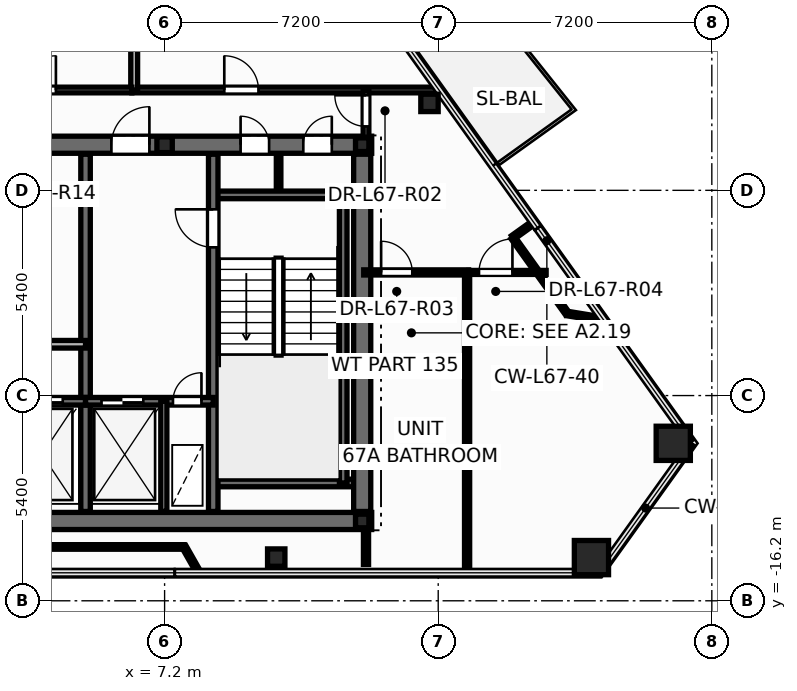
"""IFC4 building model, lengths in metres.
Left out: names, types, materials, properties, quantities, classifications, styles, units other than length and angle.
Written with IfcOpenShell. Run it as: python <this file> out.ifc"""

import sys

from ifc_helpers import new_model, si_unit, direction, frame, frame_2d, origin, origin_2d, place, context, subcontext, project, spatial, rectangle, hollow_rectangle, hollow_circle, i_section, extrude, element, fill, save


model = new_model("IFC4")
c1 = context("Model", 3, precision=1e-05, world=origin(), true_north=direction((0.0, 1.0)))
c2 = subcontext(c1, "Body", "Model", "MODEL_VIEW")
j1 = project(units=[si_unit("LENGTHUNIT", "METRE"), si_unit("PLANEANGLEUNIT", "RADIAN")], contexts=[c1])
p1 = place(None, origin())
s1 = spatial("IfcSite", under=j1, at=p1, CompositionType="ELEMENT")
p2 = place(p1, origin())
s2 = spatial("IfcBuilding", under=s1, at=p2, CompositionType="ELEMENT")
p3 = place(p2, frame((0.0, 0.0, 256.2)))
s3 = spatial("IfcBuildingStorey", under=s2, at=p3, CompositionType="ELEMENT", Elevation=256.2)
for number, where, z_axis, x_axis in (
    (1, (18.432, -15.063, 0.0), (0.0, 0.0, 1.0), (1.0, 0.0, 0.0)),
    (2, (20.585, -12.057, 0.0), (0.0, 0.0, 1.0), (1.0, 0.0, 0.0)),
):
    element("IfcColumn", number, at=place(p3, frame(where, z_axis=z_axis, x_axis=x_axis)), inside=s3, PredefinedType="COLUMN", context=c2, shape_type="SweptSolid", body=[
        extrude(hollow_rectangle(XDim=0.9, YDim=0.9, WallThickness=0.04, at=origin_2d()), origin(), (0.0, 0.0, 1.0), 3.6),
    ])
for number, where, z_axis, x_axis in (
    (3, (10.138, -15.063, 0.0), (0.0, 0.0, 1.0), (1.0, 0.0, 0.0)),
    (4, (14.171, -3.099, 0.0), (0.0, 0.0, 1.0), (1.0, 0.0, 0.0)),
):
    element("IfcColumn", number, at=place(p3, frame(where, z_axis=z_axis, x_axis=x_axis)), inside=s3, PredefinedType="COLUMN", context=c2, shape_type="SweptSolid", body=[
        extrude(hollow_circle(Radius=0.229, WallThickness=0.016, at=origin_2d()), origin(), (0.0, 0.0, 1.0), 3.6),
    ])
for number, where, z_axis, x_axis in (
    (5, (12.4, -14.1, 0.0), (0.0, 0.0, 1.0), (1.0, 0.0, 0.0)),
    (6, (12.4, -4.2, 0.0), (0.0, 0.0, 1.0), (1.0, 0.0, 0.0)),
):
    element("IfcColumn", number, at=place(p3, frame(where, z_axis=z_axis, x_axis=x_axis)), inside=s3, PredefinedType="COLUMN", context=c2, shape_type="SweptSolid", body=[
        extrude(i_section(OverallWidth=0.352, OverallDepth=0.359, WebThickness=0.018, FlangeThickness=0.026, at=origin_2d()), origin(), (0.0, 0.0, 1.0), 3.6),
    ])
p4 = place(p3, frame((7.2, -4.2, 0.0), z_axis=(0.0, 0.0, 1.0), x_axis=(1.0, 0.0, 0.0)))
e7 = element("IfcColumn", 7, at=p4, inside=s3, PredefinedType="PILASTER", context=c2, shape_type="SweptSolid", body=[
    extrude(i_section(OverallWidth=0.405, OverallDepth=0.414, WebThickness=0.022, FlangeThickness=0.032, at=origin_2d()), origin(), (0.0, 0.0, 1.0), 3.6),
])
p5 = place(p3, frame((10.2, -5.52, 0.0), z_axis=(0.0, 0.0, 1.0), x_axis=(0.0, 1.0, 0.0)))
e8 = element("IfcWall", 8, at=p5, inside=s3, PredefinedType="PARTITIONING", context=c2, shape_type="SweptSolid", body=[
    extrude(rectangle(XDim=1.12, YDim=0.12, at=frame_2d((0.56, 0.0))), origin(), (0.0, 0.0, 1.0), 3.345),
])
p6 = place(p3, frame((-12.65, -14.1, 0.0), z_axis=(0.0, 0.0, 1.0), x_axis=(1.0, 0.0, 0.0)))
e9 = element("IfcWall", 9, at=p6, inside=s3, PredefinedType="SHEAR", context=c2, shape_type="SweptSolid", body=[
    extrude(rectangle(XDim=25.3, YDim=0.45, at=frame_2d((12.65, 0.0))), origin(), (0.0, 0.0, 1.0), 3.6),
])
p7 = place(p3, frame((-12.65, -4.2, 0.0), z_axis=(0.0, 0.0, 1.0), x_axis=(1.0, 0.0, 0.0)))
e10 = element("IfcWall", 10, at=p7, inside=s3, PredefinedType="SHEAR", context=c2, shape_type="SweptSolid", body=[
    extrude(rectangle(XDim=25.3, YDim=0.45, at=frame_2d((12.65, 0.0))), origin(), (0.0, 0.0, 1.0), 3.6),
])
p8 = place(p7, frame((1.85, 0.0, 0.0)))
e11 = element("IfcOpeningElement", 11, at=p8, cuts=e10, PredefinedType="OPENING", context=c2, shape_type="SweptSolid", body=[
    extrude(rectangle(XDim=0.756, YDim=2.054, at=frame_2d((0.375, 1.027))), frame((0.0, 0.235, 0.0), z_axis=(0.0, -1.0, 0.0), x_axis=(1.0, 0.0, 0.0)), (0.0, 0.0, 1.0), 0.47),
])
p9 = place(p7, frame((21.85, 0.0, 0.0)))
e12 = element("IfcOpeningElement", 12, at=p9, cuts=e10, PredefinedType="OPENING", context=c2, shape_type="SweptSolid", body=[
    extrude(rectangle(XDim=0.756, YDim=2.054, at=frame_2d((0.375, 1.027))), frame((0.0, 0.235, 0.0), z_axis=(0.0, -1.0, 0.0), x_axis=(1.0, 0.0, 0.0)), (0.0, 0.0, 1.0), 0.47),
])
p10 = place(p7, frame((23.5, 0.0, 0.0)))
e13 = element("IfcOpeningElement", 13, at=p10, cuts=e10, PredefinedType="OPENING", context=c2, shape_type="SweptSolid", body=[
    extrude(rectangle(XDim=0.756, YDim=2.054, at=frame_2d((0.375, 1.027))), frame((0.0, 0.235, 0.0), z_axis=(0.0, -1.0, 0.0), x_axis=(1.0, 0.0, 0.0)), (0.0, 0.0, 1.0), 0.47),
])
p11 = place(p7, frame((5.85, 0.0, 0.0)))
e14 = element("IfcOpeningElement", 14, at=p11, cuts=e10, PredefinedType="OPENING", context=c2, shape_type="SweptSolid", body=[
    extrude(rectangle(XDim=1.006, YDim=2.104, at=frame_2d((0.5, 1.052))), frame((0.0, 0.235, 0.0), z_axis=(0.0, -1.0, 0.0), x_axis=(1.0, 0.0, 0.0)), (0.0, 0.0, 1.0), 0.47),
])
p12 = place(p7, frame((10.35, 0.0, 0.0)))
e15 = element("IfcOpeningElement", 15, at=p12, cuts=e10, PredefinedType="OPENING", context=c2, shape_type="SweptSolid", body=[
    extrude(rectangle(XDim=1.406, YDim=2.154, at=frame_2d((0.7, 1.077))), frame((0.0, 0.235, 0.0), z_axis=(0.0, -1.0, 0.0), x_axis=(1.0, 0.0, 0.0)), (0.0, 0.0, 1.0), 0.47),
])
p13 = place(p7, frame((18.45, 0.0, 0.0)))
e16 = element("IfcOpeningElement", 16, at=p13, cuts=e10, PredefinedType="OPENING", context=c2, shape_type="SweptSolid", body=[
    extrude(rectangle(XDim=1.006, YDim=2.104, at=frame_2d((0.5, 1.052))), frame((0.0, 0.235, 0.0), z_axis=(0.0, -1.0, 0.0), x_axis=(1.0, 0.0, 0.0)), (0.0, 0.0, 1.0), 0.47),
])
for number, where, z_axis, x_axis in (
    (17, (8.48, -5.52, 0.0), (0.0, 0.0, 1.0), (1.0, 0.0, 0.0)),
    (18, (8.48, -13.1, 0.0), (0.0, 0.0, 1.0), (1.0, 0.0, 0.0)),
):
    element("IfcWall", number, at=place(p3, frame(where, z_axis=z_axis, x_axis=x_axis)), inside=s3, PredefinedType="SOLIDWALL", context=c2, shape_type="SweptSolid", body=[
        extrude(rectangle(XDim=3.87, YDim=0.2, at=frame_2d((1.935, 0.0))), origin(), (0.0, 0.0, 1.0), 3.6),
    ])
p14 = place(p3, frame((11.9, -13.1, 0.0), z_axis=(0.0, 0.0, 1.0), x_axis=(0.0, 1.0, 0.0)))
e19 = element("IfcWall", 19, at=p14, inside=s3, PredefinedType="SOLIDWALL", context=c2, shape_type="SweptSolid", body=[
    extrude(rectangle(XDim=7.58, YDim=0.2, at=frame_2d((3.79, 0.0))), origin(), (0.0, 0.0, 1.0), 3.6),
])
p15 = place(p3, frame((8.48, -13.85, 0.0), z_axis=(0.0, 0.0, 1.0), x_axis=(0.0, 1.0, 0.0)))
e20 = element("IfcWall", 20, at=p15, inside=s3, PredefinedType="SHEAR", context=c2, shape_type="SweptSolid", body=[
    extrude(rectangle(XDim=9.4, YDim=0.25, at=frame_2d((4.7, 0.0))), origin(), (0.0, 0.0, 1.0), 3.6),
])
p16 = place(p15, frame((6.95, 0.0, 0.0)))
e21 = element("IfcOpeningElement", 21, at=p16, cuts=e20, PredefinedType="OPENING", context=c2, shape_type="SweptSolid", body=[
    extrude(rectangle(XDim=1.006, YDim=2.104, at=frame_2d((0.5, 1.052))), frame((0.0, 0.135, 0.0), z_axis=(0.0, -1.0, 0.0), x_axis=(1.0, 0.0, 0.0)), (0.0, 0.0, 1.0), 0.27),
])
p17 = place(p3, frame((5.12, -13.85, 0.0), z_axis=(0.0, 0.0, 1.0), x_axis=(0.0, 1.0, 0.0)))
e22 = element("IfcWall", 22, at=p17, inside=s3, PredefinedType="SHEAR", context=c2, shape_type="SweptSolid", body=[
    extrude(rectangle(XDim=9.4, YDim=0.25, at=frame_2d((4.7, 0.0))), origin(), (0.0, 0.0, 1.0), 3.6),
])
p18 = place(p3, frame((-5.12, -10.95, 0.0), z_axis=(0.0, 0.0, 1.0), x_axis=(1.0, 0.0, 0.0)))
e23 = element("IfcWall", 23, at=p18, inside=s3, PredefinedType="SOLIDWALL", context=c2, shape_type="SweptSolid", body=[
    extrude(rectangle(XDim=10.24, YDim=0.2, at=frame_2d((5.12, 0.0))), origin(), (0.0, 0.0, 1.0), 3.6),
])
p19 = place(p18, frame((0.6, 0.0, 0.0)))
e24 = element("IfcOpeningElement", 24, at=p19, cuts=e23, PredefinedType="OPENING", context=c2, shape_type="SweptSolid", body=[
    extrude(rectangle(XDim=1.106, YDim=2.104, at=frame_2d((0.55, 1.052))), frame((0.0, 0.11, 0.0), z_axis=(0.0, -1.0, 0.0), x_axis=(1.0, 0.0, 0.0)), (0.0, 0.0, 1.0), 0.22),
])
p20 = place(p18, frame((2.67, 0.0, 0.0)))
e25 = element("IfcOpeningElement", 25, at=p20, cuts=e23, PredefinedType="OPENING", context=c2, shape_type="SweptSolid", body=[
    extrude(rectangle(XDim=1.106, YDim=2.104, at=frame_2d((0.55, 1.052))), frame((0.0, 0.11, 0.0), z_axis=(0.0, -1.0, 0.0), x_axis=(1.0, 0.0, 0.0)), (0.0, 0.0, 1.0), 0.22),
])
p21 = place(p18, frame((4.57, 0.0, 0.0)))
e26 = element("IfcOpeningElement", 26, at=p21, cuts=e23, PredefinedType="OPENING", context=c2, shape_type="SweptSolid", body=[
    extrude(rectangle(XDim=1.106, YDim=2.104, at=frame_2d((0.55, 1.052))), frame((0.0, 0.11, 0.0), z_axis=(0.0, -1.0, 0.0), x_axis=(1.0, 0.0, 0.0)), (0.0, 0.0, 1.0), 0.22),
])
p22 = place(p18, frame((6.47, 0.0, 0.0)))
e27 = element("IfcOpeningElement", 27, at=p22, cuts=e23, PredefinedType="OPENING", context=c2, shape_type="SweptSolid", body=[
    extrude(rectangle(XDim=1.106, YDim=2.104, at=frame_2d((0.55, 1.052))), frame((0.0, 0.11, 0.0), z_axis=(0.0, -1.0, 0.0), x_axis=(1.0, 0.0, 0.0)), (0.0, 0.0, 1.0), 0.22),
])
p23 = place(p18, frame((8.54, 0.0, 0.0)))
e28 = element("IfcOpeningElement", 28, at=p23, cuts=e23, PredefinedType="OPENING", context=c2, shape_type="SweptSolid", body=[
    extrude(rectangle(XDim=1.106, YDim=2.104, at=frame_2d((0.55, 1.052))), frame((0.0, 0.11, 0.0), z_axis=(0.0, -1.0, 0.0), x_axis=(1.0, 0.0, 0.0)), (0.0, 0.0, 1.0), 0.22),
])
p24 = place(p3, frame((5.12, -10.95, 0.0), z_axis=(0.0, 0.0, 1.0), x_axis=(1.0, 0.0, 0.0)))
e29 = element("IfcWall", 29, at=p24, inside=s3, PredefinedType="SOLIDWALL", context=c2, shape_type="SweptSolid", body=[
    extrude(rectangle(XDim=3.36, YDim=0.2, at=frame_2d((1.68, 0.0))), origin(), (0.0, 0.0, 1.0), 3.6),
])
p25 = place(p24, frame((0.42, 0.0, 0.0)))
e30 = element("IfcOpeningElement", 30, at=p25, cuts=e29, PredefinedType="OPENING", context=c2, shape_type="SweptSolid", body=[
    extrude(rectangle(XDim=1.106, YDim=2.104, at=frame_2d((0.55, 1.052))), frame((0.0, 0.11, 0.0), z_axis=(0.0, -1.0, 0.0), x_axis=(1.0, 0.0, 0.0)), (0.0, 0.0, 1.0), 0.22),
])
p26 = place(p24, frame((2.3, 0.0, 0.0)))
e31 = element("IfcOpeningElement", 31, at=p26, cuts=e29, PredefinedType="OPENING", context=c2, shape_type="SweptSolid", body=[
    extrude(rectangle(XDim=0.756, YDim=2.054, at=frame_2d((0.375, 1.027))), frame((0.0, 0.11, 0.0), z_axis=(0.0, -1.0, 0.0), x_axis=(1.0, 0.0, 0.0)), (0.0, 0.0, 1.0), 0.22),
])
p27 = place(p3, frame((7.18, -13.85, 0.0), z_axis=(0.0, 0.0, 1.0), x_axis=(0.0, 1.0, 0.0)))
e32 = element("IfcWall", 32, at=p27, inside=s3, PredefinedType="PARTITIONING", context=c2, shape_type="SweptSolid", body=[
    extrude(rectangle(XDim=2.9, YDim=0.16, at=frame_2d((1.45, 0.0))), origin(), (0.0, 0.0, 1.0), 2.57),
])
p28 = place(p3, frame((12.4, -13.85, 0.0), z_axis=(0.0, 0.0, 1.0), x_axis=(0.0, 1.0, 0.0)))
e33 = element("IfcWall", 33, at=p28, inside=s3, PredefinedType="SHEAR", context=c2, shape_type="SweptSolid", body=[
    extrude(rectangle(XDim=9.4, YDim=0.45, at=frame_2d((4.7, 0.0))), origin(), (0.0, 0.0, 1.0), 3.6),
])
p29 = place(p3, frame((2.88, -9.45, 0.0), z_axis=(0.0, 0.0, 1.0), x_axis=(1.0, 0.0, 0.0)))
e34 = element("IfcWall", 34, at=p29, inside=s3, PredefinedType="SOLIDWALL", context=c2, shape_type="SweptSolid", body=[
    extrude(rectangle(XDim=2.24, YDim=0.2, at=frame_2d((1.12, 0.0))), origin(), (0.0, 0.0, 1.0), 3.345),
])
p30 = place(p3, frame((6.34, -2.76, 0.0), z_axis=(0.0, 0.0, 1.0), x_axis=(1.0, 0.0, 0.0)))
e35 = element("IfcWall", 35, at=p30, inside=s3, PredefinedType="PARTITIONING", context=c2, shape_type="SweptSolid", body=[
    extrude(rectangle(XDim=8.08, YDim=0.15, at=frame_2d((4.04, 0.0))), origin(), (0.0, 0.0, 1.0), 2.32),
])
p31 = place(p30, frame((2.431, 0.0, 0.0)))
e36 = element("IfcOpeningElement", 36, at=p31, cuts=e35, PredefinedType="OPENING", context=c2, shape_type="SweptSolid", body=[
    extrude(rectangle(XDim=0.906, YDim=2.104, at=frame_2d((0.45, 1.052))), frame((0.0, 0.085, 0.0), z_axis=(0.0, -1.0, 0.0), x_axis=(1.0, 0.0, 0.0)), (0.0, 0.0, 1.0), 0.17),
])
p32 = place(p3, frame((15.16, -15.463, 0.0), z_axis=(0.0, 0.0, 1.0), x_axis=(0.0, 1.0, 0.0)))
e37 = element("IfcWall", 37, at=p32, inside=s3, PredefinedType="PARTITIONING", context=c2, shape_type="SweptSolid", body=[
    extrude(rectangle(XDim=7.903, YDim=0.135, at=frame_2d((3.952, 0.0))), origin(), (0.0, 0.0, 1.0), 2.863),
])
p33 = place(p3, frame((6.4, -2.76, 0.0), z_axis=(0.0, 0.0, 1.0), x_axis=(0.0, 1.0, 0.0)))
e38 = element("IfcWall", 38, at=p33, inside=s3, PredefinedType="PARTITIONING", context=c2, shape_type="SweptSolid", body=[
    extrude(rectangle(XDim=10.96, YDim=0.18, at=frame_2d((5.48, 0.0))), origin(), (0.0, 0.0, 1.0), 2.32),
])
p34 = place(p3, frame((3.27, -14.783, 0.0), z_axis=(0.0, 0.0, 1.0), x_axis=(1.0, 0.0, 0.0)))
e39 = element("IfcWall", 39, at=p34, inside=s3, PredefinedType="PARTITIONING", context=c2, shape_type="SweptSolid", body=[
    extrude(rectangle(XDim=4.445, YDim=0.12, at=frame_2d((2.223, 0.0))), origin(), (0.0, 0.0, 1.0), 3.345),
])
p35 = place(p3, frame((3.04, -2.76, 0.0), z_axis=(0.0, 0.0, 1.0), x_axis=(1.0, 0.0, 0.0)))
e40 = element("IfcWall", 40, at=p35, inside=s3, PredefinedType="PARTITIONING", context=c2, shape_type="SweptSolid", body=[
    extrude(rectangle(XDim=3.298, YDim=0.15, at=frame_2d((1.649, 0.0))), origin(), (0.0, 0.0, 1.0), 2.964),
])
p36 = place(p35, frame((0.4, 0.0, 0.0)))
e41 = element("IfcOpeningElement", 41, at=p36, cuts=e40, PredefinedType="OPENING", context=c2, shape_type="SweptSolid", body=[
    extrude(rectangle(XDim=0.906, YDim=2.104, at=frame_2d((0.45, 1.052))), frame((0.0, 0.085, 0.0), z_axis=(0.0, -1.0, 0.0), x_axis=(1.0, 0.0, 0.0)), (0.0, 0.0, 1.0), 0.17),
])
p37 = place(p3, frame((12.44, -7.56, 0.0), z_axis=(0.0, 0.0, 1.0), x_axis=(1.0, 0.0, 0.0)))
e42 = element("IfcWall", 42, at=p37, inside=s3, PredefinedType="PARTITIONING", context=c2, shape_type="SweptSolid", body=[
    extrude(rectangle(XDim=2.76, YDim=0.135, at=frame_2d((1.38, 0.0))), origin(), (0.0, 0.0, 1.0), 2.863),
])
p38 = place(p37, frame((0.458, 0.0, 0.0)))
e43 = element("IfcOpeningElement", 43, at=p38, cuts=e42, PredefinedType="OPENING", context=c2, shape_type="SweptSolid", body=[
    extrude(rectangle(XDim=0.826, YDim=2.104, at=frame_2d((0.41, 1.052))), frame((0.0, 0.078, 0.0), z_axis=(0.0, -1.0, 0.0), x_axis=(1.0, 0.0, 0.0)), (0.0, 0.0, 1.0), 0.155),
])
p39 = place(p3, frame((17.795, -8.641, 0.0), z_axis=(0.0, 0.0, 1.0), x_axis=(-0.582204312634, 0.813042519399, 0.0)))
e44 = element("IfcWall", 44, at=p39, inside=s3, PredefinedType="PARTITIONING", context=c2, shape_type="SweptSolid", body=[
    extrude(rectangle(XDim=2.461, YDim=0.12, at=frame_2d((1.23, 0.0))), origin(), (0.0, 0.0, 1.0), 3.345),
])
p40 = place(p3, frame((15.202, -7.56, 0.0), z_axis=(0.0, 0.0, 1.0), x_axis=(1.0, 0.0, 0.0)))
e45 = element("IfcWall", 45, at=p40, inside=s3, PredefinedType="PARTITIONING", context=c2, shape_type="SweptSolid", body=[
    extrude(rectangle(XDim=2.038, YDim=0.105, at=frame_2d((1.019, 0.0))), origin(), (0.0, 0.0, 1.0), 2.32),
])
p41 = place(p40, frame((0.271, 0.0, 0.0)))
e46 = element("IfcOpeningElement", 46, at=p41, cuts=e45, PredefinedType="OPENING", context=c2, shape_type="SweptSolid", body=[
    extrude(rectangle(XDim=0.886, YDim=2.104, at=frame_2d((0.44, 1.052))), frame((0.0, 0.062, 0.0), z_axis=(0.0, -1.0, 0.0), x_axis=(1.0, 0.0, 0.0)), (0.0, 0.0, 1.0), 0.125),
])
p42 = place(p3, frame((12.5, -4.24, 0.0), z_axis=(0.0, 0.0, 1.0), x_axis=(0.0, 1.0, 0.0)))
e47 = element("IfcWall", 47, at=p42, inside=s3, PredefinedType="PARTITIONING", context=c2, shape_type="SweptSolid", body=[
    extrude(rectangle(XDim=1.48, YDim=0.15, at=frame_2d((0.74, 0.0))), origin(), (0.0, 0.0, 1.0), 2.32),
])
p43 = place(p42, frame((0.522, 0.0, 0.0)))
e48 = element("IfcOpeningElement", 48, at=p43, cuts=e47, PredefinedType="OPENING", context=c2, shape_type="SweptSolid", body=[
    extrude(rectangle(XDim=0.826, YDim=2.104, at=frame_2d((0.41, 1.052))), frame((0.0, 0.085, 0.0), z_axis=(0.0, -1.0, 0.0), x_axis=(1.0, 0.0, 0.0)), (0.0, 0.0, 1.0), 0.17),
])
p44 = place(p3, frame((18.634, -8.778, 0.0), z_axis=(0.0, 0.0, 1.0), x_axis=(-0.987008329949, 0.160669090402, 0.0)))
e49 = element("IfcWall", 49, at=p44, inside=s3, PredefinedType="PARTITIONING", context=c2, shape_type="SweptSolid", body=[
    extrude(rectangle(XDim=0.849, YDim=0.12, at=frame_2d((0.425, 0.0))), origin(), (0.0, 0.0, 1.0), 2.863),
])
p45 = place(p3, frame((7.715, -14.783, 0.0), z_axis=(0.0, 0.0, 1.0), x_axis=(0.494091029217, -0.869410176411, 0.0)))
e50 = element("IfcWall", 50, at=p45, inside=s3, PredefinedType="PARTITIONING", context=c2, shape_type="SweptSolid", body=[
    extrude(rectangle(XDim=0.771, YDim=0.12, at=frame_2d((0.385, 0.0))), origin(), (0.0, 0.0, 1.0), 2.863),
])
p46 = place(p3, frame((16.362, -6.64, 0.0), z_axis=(0.0, 0.0, 1.0), x_axis=(0.813142011208, 0.582065348229, 0.0)))
e51 = element("IfcWall", 51, at=p46, inside=s3, PredefinedType="PARTITIONING", context=c2, shape_type="SweptSolid", body=[
    extrude(rectangle(XDim=0.67, YDim=0.12, at=frame_2d((0.335, 0.0))), origin(), (0.0, 0.0, 1.0), 2.863),
])
p47 = place(p3, frame((12.5, -15.243, 0.0), z_axis=(0.0, 0.0, 1.0), x_axis=(0.0, 1.0, 0.0)))
e52 = element("IfcWall", 52, at=p47, inside=s3, PredefinedType="PARTITIONING", context=c2, shape_type="SweptSolid", body=[
    extrude(rectangle(XDim=0.844, YDim=0.135, at=frame_2d((0.422, 0.0))), origin(), (0.0, 0.0, 1.0), 2.863),
])
p48 = place(p16, origin())
e53 = element("IfcDoor", 53, at=p48, inside=s3, OperationType="SINGLE_SWING_RIGHT", PredefinedType="DOOR", context=c2, shape_type="SweptSolid", body=[
    extrude(rectangle(XDim=1.0, YDim=2.1, at=frame_2d((0.5, 1.05))), frame((0.0, 0.025, 0.0), z_axis=(0.0, -1.0, 0.0), x_axis=(1.0, 0.0, 0.0)), (0.0, 0.0, 1.0), 0.05),
])
fill(e21, e53)
p49 = place(p25, origin())
e54 = element("IfcDoor", 54, at=p49, inside=s3, OperationType="DOUBLE_DOOR_SLIDING", PredefinedType="DOOR", context=c2, shape_type="SweptSolid", body=[
    extrude(rectangle(XDim=1.1, YDim=2.1, at=frame_2d((0.55, 1.05))), frame((0.0, 0.025, 0.0), z_axis=(0.0, -1.0, 0.0), x_axis=(1.0, 0.0, 0.0)), (0.0, 0.0, 1.0), 0.05),
])
fill(e30, e54)
p50 = place(p26, origin())
e55 = element("IfcDoor", 55, at=p50, inside=s3, OperationType="SINGLE_SWING_RIGHT", PredefinedType="DOOR", context=c2, shape_type="SweptSolid", body=[
    extrude(rectangle(XDim=0.75, YDim=2.05, at=frame_2d((0.375, 1.025))), frame((0.0, 0.025, 0.0), z_axis=(0.0, -1.0, 0.0), x_axis=(1.0, 0.0, 0.0)), (0.0, 0.0, 1.0), 0.05),
])
fill(e31, e55)
p51 = place(p23, origin())
e56 = element("IfcDoor", 56, at=p51, inside=s3, OperationType="DOUBLE_DOOR_SLIDING", PredefinedType="DOOR", context=c2, shape_type="SweptSolid", body=[
    extrude(rectangle(XDim=1.1, YDim=2.1, at=frame_2d((0.55, 1.05))), frame((0.0, 0.025, 0.0), z_axis=(0.0, -1.0, 0.0), x_axis=(1.0, 0.0, 0.0)), (0.0, 0.0, 1.0), 0.05),
])
fill(e28, e56)
p52 = place(p9, origin())
e57 = element("IfcDoor", 57, at=p52, inside=s3, OperationType="SINGLE_SWING_LEFT", PredefinedType="DOOR", context=c2, shape_type="SweptSolid", body=[
    extrude(rectangle(XDim=0.75, YDim=2.05, at=frame_2d((0.375, 1.025))), frame((0.0, 0.025, 0.0), z_axis=(0.0, -1.0, 0.0), x_axis=(1.0, 0.0, 0.0)), (0.0, 0.0, 1.0), 0.05),
])
fill(e12, e57)
p53 = place(p10, origin())
e58 = element("IfcDoor", 58, at=p53, inside=s3, OperationType="SINGLE_SWING_RIGHT", PredefinedType="DOOR", context=c2, shape_type="SweptSolid", body=[
    extrude(rectangle(XDim=0.75, YDim=2.05, at=frame_2d((0.375, 1.025))), frame((0.0, 0.025, 0.0), z_axis=(0.0, -1.0, 0.0), x_axis=(1.0, 0.0, 0.0)), (0.0, 0.0, 1.0), 0.05),
])
fill(e13, e58)
p54 = place(p13, origin())
e59 = element("IfcDoor", 59, at=p54, inside=s3, OperationType="SINGLE_SWING_RIGHT", PredefinedType="DOOR", context=c2, shape_type="SweptSolid", body=[
    extrude(rectangle(XDim=1.0, YDim=2.1, at=frame_2d((0.5, 1.05))), frame((0.0, 0.025, 0.0), z_axis=(0.0, -1.0, 0.0), x_axis=(1.0, 0.0, 0.0)), (0.0, 0.0, 1.0), 0.05),
])
fill(e16, e59)
p55 = place(p43, origin())
e60 = element("IfcDoor", 60, at=p55, inside=s3, OperationType="SINGLE_SWING_RIGHT", PredefinedType="DOOR", context=c2, shape_type="SweptSolid", body=[
    extrude(rectangle(XDim=0.82, YDim=2.1, at=frame_2d((0.41, 1.05))), frame((0.0, 0.025, 0.0), z_axis=(0.0, -1.0, 0.0), x_axis=(1.0, 0.0, 0.0)), (0.0, 0.0, 1.0), 0.05),
])
fill(e48, e60)
p56 = place(p38, origin())
e61 = element("IfcDoor", 61, at=p56, inside=s3, OperationType="SINGLE_SWING_LEFT", PredefinedType="DOOR", context=c2, shape_type="SweptSolid", body=[
    extrude(rectangle(XDim=0.82, YDim=2.1, at=frame_2d((0.41, 1.05))), frame((0.0, 0.025, 0.0), z_axis=(0.0, -1.0, 0.0), x_axis=(1.0, 0.0, 0.0)), (0.0, 0.0, 1.0), 0.05),
])
fill(e43, e61)
p57 = place(p41, origin())
e62 = element("IfcDoor", 62, at=p57, inside=s3, OperationType="SINGLE_SWING_RIGHT", PredefinedType="DOOR", context=c2, shape_type="SweptSolid", body=[
    extrude(rectangle(XDim=0.88, YDim=2.1, at=frame_2d((0.44, 1.05))), frame((0.0, 0.025, 0.0), z_axis=(0.0, -1.0, 0.0), x_axis=(1.0, 0.0, 0.0)), (0.0, 0.0, 1.0), 0.05),
])
fill(e46, e62)
p58 = place(p36, origin())
e63 = element("IfcDoor", 63, at=p58, inside=s3, OperationType="SINGLE_SWING_RIGHT", PredefinedType="DOOR", context=c2, shape_type="SweptSolid", body=[
    extrude(rectangle(XDim=0.9, YDim=2.1, at=frame_2d((0.45, 1.05))), frame((0.0, 0.025, 0.0), z_axis=(0.0, -1.0, 0.0), x_axis=(1.0, 0.0, 0.0)), (0.0, 0.0, 1.0), 0.05),
])
fill(e41, e63)
p59 = place(p31, origin())
e64 = element("IfcDoor", 64, at=p59, inside=s3, OperationType="SINGLE_SWING_LEFT", PredefinedType="DOOR", context=c2, shape_type="SweptSolid", body=[
    extrude(rectangle(XDim=0.9, YDim=2.1, at=frame_2d((0.45, 1.05))), frame((0.0, 0.025, 0.0), z_axis=(0.0, -1.0, 0.0), x_axis=(1.0, 0.0, 0.0)), (0.0, 0.0, 1.0), 0.05),
])
fill(e36, e64)
save(model, sys.argv[1])
